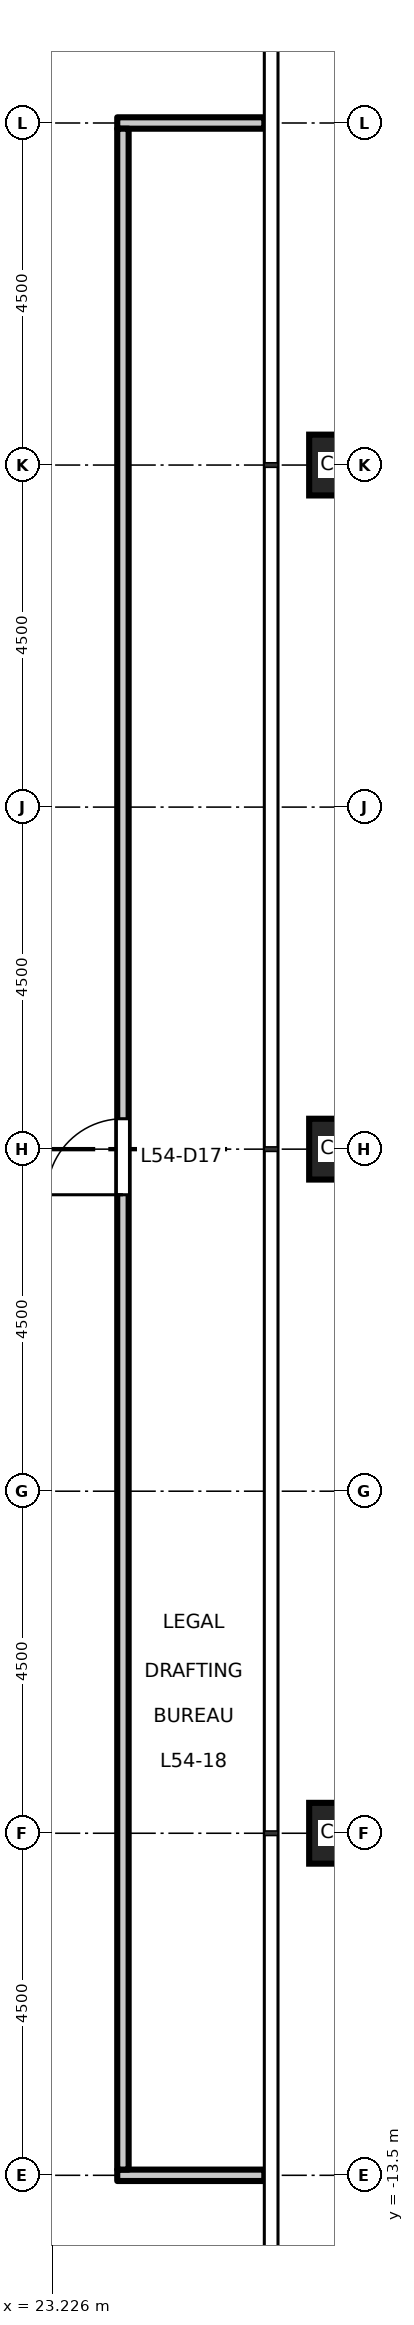
"""IFC4 building model, lengths in metres.
Left out: names, types, materials, properties, quantities, classifications, styles, units other than length and angle.
Written with IfcOpenShell. Run it as: python <this file> out.ifc"""

import sys

from ifc_helpers import new_model, si_unit, direction, frame, frame_2d, origin, origin_2d, place, context, subcontext, project, spatial, rectangle, hollow_rectangle, extrude, element, fill, save


model = new_model("IFC4")
c1 = context("Model", 3, precision=1e-05, world=origin(), true_north=direction((0.0, 1.0)))
c2 = subcontext(c1, "Body", "Model", "MODEL_VIEW")
j1 = project(units=[si_unit("LENGTHUNIT", "METRE"), si_unit("PLANEANGLEUNIT", "RADIAN")], contexts=[c1])
p1 = place(None, origin())
s1 = spatial("IfcSite", under=j1, at=p1, CompositionType="ELEMENT")
p2 = place(p1, origin())
s2 = spatial("IfcBuilding", under=s1, at=p2, CompositionType="ELEMENT")
p3 = place(p2, frame((0.0, 0.0, 251.2)))
s3 = spatial("IfcBuildingStorey", under=s2, at=p3, CompositionType="ELEMENT", Elevation=251.2)
for number, where, z_axis, x_axis in (
    (1, (27.0, -9.0, 0.0), (0.0, 0.0, 1.0), (1.0, 0.0, 0.0)),
    (2, (27.0, 0.0, 0.0), (0.0, 0.0, 1.0), (1.0, 0.0, 0.0)),
    (3, (27.0, 9.0, 0.0), (0.0, 0.0, 1.0), (1.0, 0.0, 0.0)),
):
    element("IfcColumn", number, at=place(p3, frame(where, z_axis=z_axis, x_axis=x_axis)), inside=s3, PredefinedType="COLUMN", context=c2, shape_type="SweptSolid", body=[
        extrude(hollow_rectangle(XDim=0.8, YDim=0.8, WallThickness=0.045, at=origin_2d()), origin(), (0.0, 0.0, 1.0), 4.5),
    ])
p4 = place(p3, frame((24.075, -13.5, 0.0), z_axis=(0.0, 0.0, 1.0), x_axis=(1.0, 0.0, 0.0)))
e4 = element("IfcWall", 4, at=p4, inside=s3, PredefinedType="PARTITIONING", context=c2, shape_type="SweptSolid", body=[
    extrude(rectangle(XDim=1.935, YDim=0.15, at=frame_2d((0.968, 0.0))), origin(), (0.0, 0.0, 1.0), 3.95),
])
p5 = place(p3, frame((24.075, 13.5, 0.0), z_axis=(0.0, 0.0, 1.0), x_axis=(1.0, 0.0, 0.0)))
e5 = element("IfcWall", 5, at=p5, inside=s3, PredefinedType="PARTITIONING", context=c2, shape_type="SweptSolid", body=[
    extrude(rectangle(XDim=1.935, YDim=0.15, at=frame_2d((0.968, 0.0))), origin(), (0.0, 0.0, 1.0), 4.35),
])
p6 = place(p3, frame((24.15, -13.425, 0.0), z_axis=(0.0, 0.0, 1.0), x_axis=(0.0, 1.0, 0.0)))
e6 = element("IfcWall", 6, at=p6, inside=s3, PredefinedType="PARTITIONING", context=c2, shape_type="SweptSolid", body=[
    extrude(rectangle(XDim=26.85, YDim=0.15, at=frame_2d((13.425, 0.0))), origin(), (0.0, 0.0, 1.0), 4.35),
])
p7 = place(p6, frame((12.825, 0.0, 0.0)))
e7 = element("IfcOpeningElement", 7, at=p7, cuts=e6, PredefinedType="OPENING", context=c2, shape_type="SweptSolid", body=[
    extrude(rectangle(XDim=1.0, YDim=2.1, at=frame_2d((0.5, 1.05))), frame((0.0, 0.085, 0.0), z_axis=(0.0, -1.0, 0.0), x_axis=(1.0, 0.0, 0.0)), (0.0, 0.0, 1.0), 0.17),
])
p8 = place(p7, origin())
e8 = element("IfcDoor", 8, at=p8, inside=s3, OperationType="SINGLE_SWING_LEFT", PredefinedType="DOOR", context=c2, shape_type="SweptSolid", body=[
    extrude(rectangle(XDim=1.0, YDim=2.1, at=frame_2d((0.5, 1.05))), frame((0.0, 0.025, 0.0), z_axis=(0.0, -1.0, 0.0), x_axis=(1.0, 0.0, 0.0)), (0.0, 0.0, 1.0), 0.05),
])
fill(e7, e8)
save(model, sys.argv[1])
